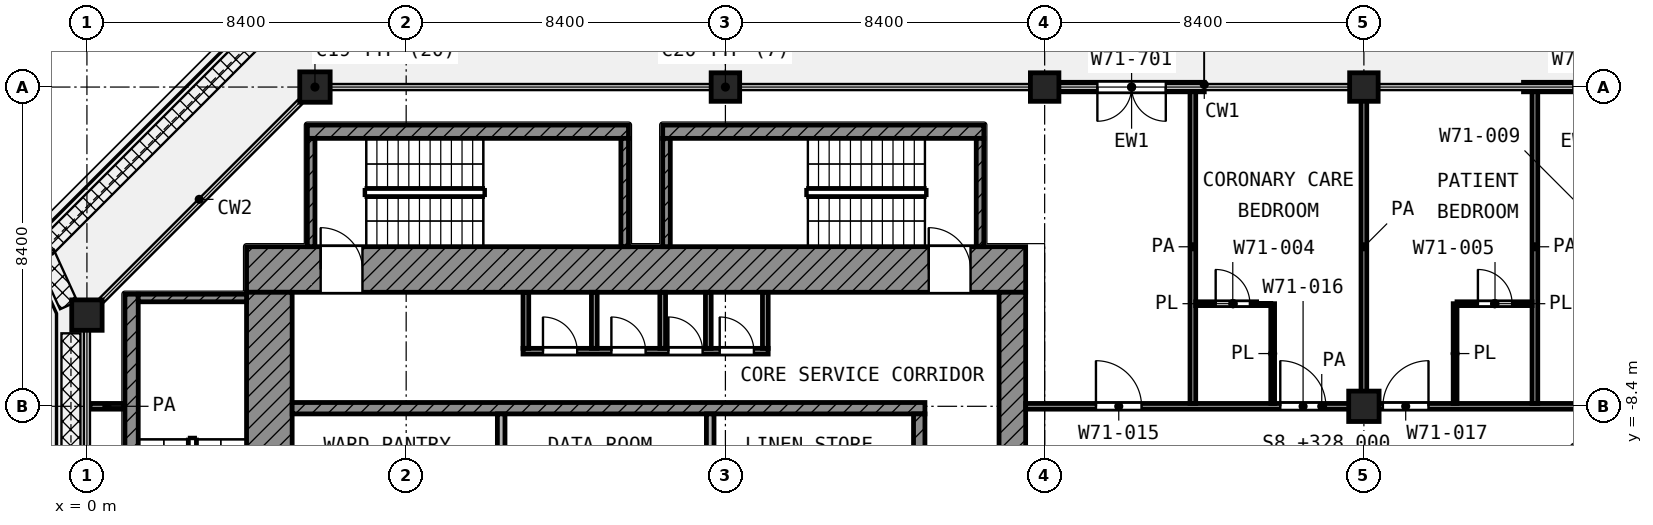
"""IFC4 building model, lengths in metres.
Left out: names, types, materials, properties, quantities, classifications, styles, units other than length and angle.
Written with IfcOpenShell. Run it as: python <this file> out.ifc"""

import sys

from ifc_helpers import new_model, si_unit, direction, frame, frame_2d, origin, origin_2d, place, context, subcontext, project, spatial, rectangle, extrude, element, fill, save


model = new_model("IFC4")
c1 = context("Model", 3, precision=1e-05, world=origin(), true_north=direction((0.0, 1.0)))
c2 = subcontext(c1, "Body", "Model", "MODEL_VIEW")
j1 = project(units=[si_unit("LENGTHUNIT", "METRE"), si_unit("PLANEANGLEUNIT", "RADIAN")], contexts=[c1])
p1 = place(None, origin())
s1 = spatial("IfcSite", under=j1, at=p1, CompositionType="ELEMENT")
p2 = place(p1, origin())
s2 = spatial("IfcBuilding", under=s1, at=p2, CompositionType="ELEMENT")
p3 = place(p2, frame((0.0, 0.0, 328.0)))
s3 = spatial("IfcBuildingStorey", under=s2, at=p3, CompositionType="ELEMENT", Elevation=328.0)
p4 = place(p3, frame((6.0, 0.0, 0.0), z_axis=(0.0, 0.0, 1.0), x_axis=(1.0, 0.0, 0.0)))
e1 = element("IfcColumn", 1, at=p4, inside=s3, PredefinedType="COLUMN", context=c2, shape_type="SweptSolid", body=[
    extrude(rectangle(XDim=0.8, YDim=0.8, at=origin_2d()), origin(), (0.0, 0.0, 1.0), 4.2),
])
for number, where, z_axis, x_axis in (
    (2, (16.8, 0.0, 0.0), (0.0, 0.0, 1.0), (1.0, 0.0, 0.0)),
    (3, (25.2, 0.0, 0.0), (0.0, 0.0, 1.0), (1.0, 0.0, 0.0)),
    (4, (33.6, 0.0, 0.0), (0.0, 0.0, 1.0), (1.0, 0.0, 0.0)),
):
    element("IfcColumn", number, at=place(p3, frame(where, z_axis=z_axis, x_axis=x_axis)), inside=s3, PredefinedType="COLUMN", context=c2, shape_type="SweptSolid", body=[
        extrude(rectangle(XDim=0.75, YDim=0.75, at=origin_2d()), origin(), (0.0, 0.0, 1.0), 4.2),
    ])
for number, where, z_axis, x_axis in (
    (5, (0.0, -6.0, 0.0), (0.0, 0.0, 1.0), (1.0, 0.0, 0.0)),
    (6, (33.6, -8.4, 0.0), (0.0, 0.0, 1.0), (1.0, 0.0, 0.0)),
):
    element("IfcColumn", number, at=place(p3, frame(where, z_axis=z_axis, x_axis=x_axis)), inside=s3, PredefinedType="COLUMN", context=c2, shape_type="SweptSolid", body=[
        extrude(rectangle(XDim=0.8, YDim=0.8, at=origin_2d()), origin(), (0.0, 0.0, 1.0), 4.2),
    ])
p5 = place(p3, frame((41.625, 0.0, 0.0), z_axis=(0.0, 0.0, 1.0), x_axis=(-1.0, 0.0, 0.0)))
e7 = element("IfcWall", 7, at=p5, inside=s3, PredefinedType="SOLIDWALL", context=c2, shape_type="SweptSolid", body=[
    extrude(rectangle(XDim=3.825, YDim=0.25, at=frame_2d((1.913, 0.0))), origin(), (0.0, 0.0, 1.0), 3.66),
])
p6 = place(p5, frame((1.512, 0.0, 0.0)))
e8 = element("IfcOpeningElement", 8, at=p6, cuts=e7, PredefinedType="OPENING", context=c2, shape_type="SweptSolid", body=[
    extrude(rectangle(XDim=1.0, YDim=2.1, at=frame_2d((0.5, 1.05))), frame((0.0, 0.135, 0.0), z_axis=(0.0, -1.0, 0.0), x_axis=(1.0, 0.0, 0.0)), (0.0, 0.0, 1.0), 0.27),
])
p7 = place(p3, frame((29.4, 0.0, 0.0), z_axis=(0.0, 0.0, 1.0), x_axis=(-1.0, 0.0, 0.0)))
e9 = element("IfcWall", 9, at=p7, inside=s3, PredefinedType="SOLIDWALL", context=c2, shape_type="SweptSolid", body=[
    extrude(rectangle(XDim=3.825, YDim=0.25, at=frame_2d((1.913, 0.0))), origin(), (0.0, 0.0, 1.0), 3.66),
])
p8 = place(p7, frame((1.012, 0.0, 0.0)))
e10 = element("IfcOpeningElement", 10, at=p8, cuts=e9, PredefinedType="OPENING", context=c2, shape_type="SweptSolid", body=[
    extrude(rectangle(XDim=1.8, YDim=2.1, at=frame_2d((0.9, 1.05))), frame((0.0, 0.135, 0.0), z_axis=(0.0, -1.0, 0.0), x_axis=(1.0, 0.0, 0.0)), (0.0, 0.0, 1.0), 0.27),
])
p9 = place(p3, frame((4.2, -4.8, 0.0), z_axis=(0.0, 0.0, 1.0), x_axis=(1.0, 0.0, 0.0)))
e11 = element("IfcWall", 11, at=p9, inside=s3, PredefinedType="SHEAR", context=c2, shape_type="SweptSolid", body=[
    extrude(rectangle(XDim=20.5, YDim=1.2, at=frame_2d((10.25, 0.0))), origin(), (0.0, 0.0, 1.0), 3.78),
])
p10 = place(p9, frame((1.95, 0.0, 0.0)))
e12 = element("IfcOpeningElement", 12, at=p10, cuts=e11, PredefinedType="OPENING", context=c2, shape_type="SweptSolid", body=[
    extrude(rectangle(XDim=1.1, YDim=2.1, at=frame_2d((0.55, 1.05))), frame((0.0, 0.61, 0.0), z_axis=(0.0, -1.0, 0.0), x_axis=(1.0, 0.0, 0.0)), (0.0, 0.0, 1.0), 1.22),
])
p11 = place(p9, frame((17.95, 0.0, 0.0)))
e13 = element("IfcOpeningElement", 13, at=p11, cuts=e11, PredefinedType="OPENING", context=c2, shape_type="SweptSolid", body=[
    extrude(rectangle(XDim=1.1, YDim=2.1, at=frame_2d((0.55, 1.05))), frame((0.0, 0.61, 0.0), z_axis=(0.0, -1.0, 0.0), x_axis=(1.0, 0.0, 0.0)), (0.0, 0.0, 1.0), 1.22),
])
p12 = place(p3, frame((4.8, -24.7, 0.0), z_axis=(0.0, 0.0, 1.0), x_axis=(0.0, 1.0, 0.0)))
e14 = element("IfcWall", 14, at=p12, inside=s3, PredefinedType="SHEAR", context=c2, shape_type="SweptSolid", body=[
    extrude(rectangle(XDim=19.3, YDim=1.2, at=frame_2d((9.65, 0.0))), origin(), (0.0, 0.0, 1.0), 3.78),
])
p13 = place(p12, frame((11.15, 0.0, 0.0)))
e15 = element("IfcOpeningElement", 15, at=p13, cuts=e14, PredefinedType="OPENING", context=c2, shape_type="SweptSolid", body=[
    extrude(rectangle(XDim=1.1, YDim=2.1, at=frame_2d((0.55, 1.05))), frame((0.0, 0.61, 0.0), z_axis=(0.0, -1.0, 0.0), x_axis=(1.0, 0.0, 0.0)), (0.0, 0.0, 1.0), 1.22),
])
p14 = place(p12, frame((1.85, 0.0, 0.0)))
e16 = element("IfcOpeningElement", 16, at=p14, cuts=e14, PredefinedType="OPENING", context=c2, shape_type="SweptSolid", body=[
    extrude(rectangle(XDim=1.1, YDim=2.1, at=frame_2d((0.55, 1.05))), frame((0.0, 0.61, 0.0), z_axis=(0.0, -1.0, 0.0), x_axis=(1.0, 0.0, 0.0)), (0.0, 0.0, 1.0), 1.22),
])
p15 = place(p3, frame((24.35, -24.0, 0.0), z_axis=(0.0, 0.0, 1.0), x_axis=(0.0, 1.0, 0.0)))
e17 = element("IfcWall", 17, at=p15, inside=s3, PredefinedType="SHEAR", context=c2, shape_type="SweptSolid", body=[
    extrude(rectangle(XDim=18.6, YDim=0.7, at=frame_2d((9.3, 0.0))), origin(), (0.0, 0.0, 1.0), 3.78),
])
p16 = place(p15, frame((10.5, 0.0, 0.0)))
e18 = element("IfcOpeningElement", 18, at=p16, cuts=e17, PredefinedType="OPENING", context=c2, shape_type="SweptSolid", body=[
    extrude(rectangle(XDim=1.8, YDim=2.1, at=frame_2d((0.9, 1.05))), frame((0.0, 0.36, 0.0), z_axis=(0.0, -1.0, 0.0), x_axis=(1.0, 0.0, 0.0)), (0.0, 0.0, 1.0), 0.72),
])
p17 = place(p3, frame((5.4, -8.45, 0.0), z_axis=(0.0, 0.0, 1.0), x_axis=(1.0, 0.0, 0.0)))
e19 = element("IfcWall", 19, at=p17, inside=s3, PredefinedType="SHEAR", context=c2, shape_type="SweptSolid", body=[
    extrude(rectangle(XDim=16.65, YDim=0.3, at=frame_2d((8.325, 0.0))), origin(), (0.0, 0.0, 1.0), 3.78),
])
p18 = place(p3, frame((21.9, -10.95, 0.0), z_axis=(0.0, 0.0, 1.0), x_axis=(0.0, 1.0, 0.0)))
e20 = element("IfcWall", 20, at=p18, inside=s3, PredefinedType="SHEAR", context=c2, shape_type="SweptSolid", body=[
    extrude(rectangle(XDim=2.35, YDim=0.3, at=frame_2d((1.175, 0.0))), origin(), (0.0, 0.0, 1.0), 3.78),
])
for number, where, z_axis, x_axis in (
    (21, (10.9, -10.95, 0.0), (0.0, 0.0, 1.0), (0.0, 1.0, 0.0)),
    (22, (16.4, -10.95, 0.0), (0.0, 0.0, 1.0), (0.0, 1.0, 0.0)),
):
    element("IfcWall", number, at=place(p3, frame(where, z_axis=z_axis, x_axis=x_axis)), inside=s3, PredefinedType="PARTITIONING", context=c2, shape_type="SweptSolid", body=[
        extrude(rectangle(XDim=2.35, YDim=0.2, at=frame_2d((1.175, 0.0))), origin(), (0.0, 0.0, 1.0), 3.78),
    ])
p19 = place(p3, frame((11.475, -6.95, 0.0), z_axis=(0.0, 0.0, 1.0), x_axis=(1.0, 0.0, 0.0)))
e23 = element("IfcWall", 23, at=p19, inside=s3, PredefinedType="PARTITIONING", context=c2, shape_type="SweptSolid", body=[
    extrude(rectangle(XDim=6.45, YDim=0.15, at=frame_2d((3.225, 0.0))), origin(), (0.0, 0.0, 1.0), 3.78),
])
p20 = place(p19, frame((0.525, 0.0, 0.0)))
e24 = element("IfcOpeningElement", 24, at=p20, cuts=e23, PredefinedType="OPENING", context=c2, shape_type="SweptSolid", body=[
    extrude(rectangle(XDim=0.9, YDim=2.1, at=frame_2d((0.45, 1.05))), frame((0.0, 0.085, 0.0), z_axis=(0.0, -1.0, 0.0), x_axis=(1.0, 0.0, 0.0)), (0.0, 0.0, 1.0), 0.17),
])
p21 = place(p19, frame((2.325, 0.0, 0.0)))
e25 = element("IfcOpeningElement", 25, at=p21, cuts=e23, PredefinedType="OPENING", context=c2, shape_type="SweptSolid", body=[
    extrude(rectangle(XDim=0.9, YDim=2.1, at=frame_2d((0.45, 1.05))), frame((0.0, 0.085, 0.0), z_axis=(0.0, -1.0, 0.0), x_axis=(1.0, 0.0, 0.0)), (0.0, 0.0, 1.0), 0.17),
])
p22 = place(p19, frame((3.825, 0.0, 0.0)))
e26 = element("IfcOpeningElement", 26, at=p22, cuts=e23, PredefinedType="OPENING", context=c2, shape_type="SweptSolid", body=[
    extrude(rectangle(XDim=0.9, YDim=2.1, at=frame_2d((0.45, 1.05))), frame((0.0, 0.085, 0.0), z_axis=(0.0, -1.0, 0.0), x_axis=(1.0, 0.0, 0.0)), (0.0, 0.0, 1.0), 0.17),
])
p23 = place(p19, frame((5.175, 0.0, 0.0)))
e27 = element("IfcOpeningElement", 27, at=p23, cuts=e23, PredefinedType="OPENING", context=c2, shape_type="SweptSolid", body=[
    extrude(rectangle(XDim=0.9, YDim=2.1, at=frame_2d((0.45, 1.05))), frame((0.0, 0.085, 0.0), z_axis=(0.0, -1.0, 0.0), x_axis=(1.0, 0.0, 0.0)), (0.0, 0.0, 1.0), 0.17),
])
for number, where, z_axis, x_axis in (
    (28, (11.55, -6.875, 0.0), (0.0, 0.0, 1.0), (0.0, 1.0, 0.0)),
    (29, (13.35, -6.875, 0.0), (0.0, 0.0, 1.0), (0.0, 1.0, 0.0)),
    (30, (15.15, -6.875, 0.0), (0.0, 0.0, 1.0), (0.0, 1.0, 0.0)),
    (31, (16.35, -6.875, 0.0), (0.0, 0.0, 1.0), (0.0, 1.0, 0.0)),
    (32, (17.85, -6.875, 0.0), (0.0, 0.0, 1.0), (0.0, 1.0, 0.0)),
):
    element("IfcWall", number, at=place(p3, frame(where, z_axis=z_axis, x_axis=x_axis)), inside=s3, PredefinedType="PARTITIONING", context=c2, shape_type="SweptSolid", body=[
        extrude(rectangle(XDim=1.475, YDim=0.15, at=frame_2d((0.738, 0.0))), origin(), (0.0, 0.0, 1.0), 3.78),
    ])
p24 = place(p3, frame((1.175, -13.9, 0.0), z_axis=(0.0, 0.0, 1.0), x_axis=(0.0, 1.0, 0.0)))
e33 = element("IfcWall", 33, at=p24, inside=s3, PredefinedType="SHEAR", context=c2, shape_type="SweptSolid", body=[
    extrude(rectangle(XDim=8.45, YDim=0.35, at=frame_2d((4.225, 0.0))), origin(), (0.0, 0.0, 1.0), 3.78),
])
p25 = place(p3, frame((1.35, -5.55, 0.0), z_axis=(0.0, 0.0, 1.0), x_axis=(1.0, 0.0, 0.0)))
e34 = element("IfcWall", 34, at=p25, inside=s3, PredefinedType="SHEAR", context=c2, shape_type="SweptSolid", body=[
    extrude(rectangle(XDim=2.85, YDim=0.2, at=frame_2d((1.425, 0.0))), origin(), (0.0, 0.0, 1.0), 3.78),
])
p26 = place(p3, frame((5.8, -1.175, 0.0), z_axis=(0.0, 0.0, 1.0), x_axis=(1.0, 0.0, 0.0)))
e35 = element("IfcWall", 35, at=p26, inside=s3, PredefinedType="SHEAR", context=c2, shape_type="SweptSolid", body=[
    extrude(rectangle(XDim=8.45, YDim=0.35, at=frame_2d((4.225, 0.0))), origin(), (0.0, 0.0, 1.0), 3.78),
])
for number, where, z_axis, x_axis in (
    (36, (5.9, -4.2, 0.0), (0.0, 0.0, 1.0), (0.0, 1.0, 0.0)),
    (37, (14.15, -4.2, 0.0), (0.0, 0.0, 1.0), (0.0, 1.0, 0.0)),
):
    element("IfcWall", number, at=place(p3, frame(where, z_axis=z_axis, x_axis=x_axis)), inside=s3, PredefinedType="SHEAR", context=c2, shape_type="SweptSolid", body=[
        extrude(rectangle(XDim=2.85, YDim=0.2, at=frame_2d((1.425, 0.0))), origin(), (0.0, 0.0, 1.0), 3.78),
    ])
p27 = place(p3, frame((15.15, -1.175, 0.0), z_axis=(0.0, 0.0, 1.0), x_axis=(1.0, 0.0, 0.0)))
e38 = element("IfcWall", 38, at=p27, inside=s3, PredefinedType="SHEAR", context=c2, shape_type="SweptSolid", body=[
    extrude(rectangle(XDim=8.45, YDim=0.35, at=frame_2d((4.225, 0.0))), origin(), (0.0, 0.0, 1.0), 3.78),
])
for number, where, z_axis, x_axis in (
    (39, (15.25, -4.2, 0.0), (0.0, 0.0, 1.0), (0.0, 1.0, 0.0)),
    (40, (23.5, -4.2, 0.0), (0.0, 0.0, 1.0), (0.0, 1.0, 0.0)),
):
    element("IfcWall", number, at=place(p3, frame(where, z_axis=z_axis, x_axis=x_axis)), inside=s3, PredefinedType="SHEAR", context=c2, shape_type="SweptSolid", body=[
        extrude(rectangle(XDim=2.85, YDim=0.2, at=frame_2d((1.425, 0.0))), origin(), (0.0, 0.0, 1.0), 3.78),
    ])
p28 = place(p3, frame((29.175, -5.7, 0.0), z_axis=(0.0, 0.0, 1.0), x_axis=(1.0, 0.0, 0.0)))
e41 = element("IfcWall", 41, at=p28, inside=s3, PredefinedType="PARTITIONING", context=c2, shape_type="SweptSolid", body=[
    extrude(rectangle(XDim=1.975, YDim=0.1, at=frame_2d((0.987, 0.0))), origin(), (0.0, 0.0, 1.0), 3.78),
])
p29 = place(p28, frame((0.525, 0.0, 0.0)))
e42 = element("IfcOpeningElement", 42, at=p29, cuts=e41, PredefinedType="OPENING", context=c2, shape_type="SweptSolid", body=[
    extrude(rectangle(XDim=0.9, YDim=2.1, at=frame_2d((0.45, 1.05))), frame((0.0, 0.06, 0.0), z_axis=(0.0, -1.0, 0.0), x_axis=(1.0, 0.0, 0.0)), (0.0, 0.0, 1.0), 0.12),
])
p30 = place(p3, frame((36.05, -5.7, 0.0), z_axis=(0.0, 0.0, 1.0), x_axis=(1.0, 0.0, 0.0)))
e43 = element("IfcWall", 43, at=p30, inside=s3, PredefinedType="PARTITIONING", context=c2, shape_type="SweptSolid", body=[
    extrude(rectangle(XDim=1.975, YDim=0.1, at=frame_2d((0.987, 0.0))), origin(), (0.0, 0.0, 1.0), 3.78),
])
p31 = place(p30, frame((0.55, 0.0, 0.0)))
e44 = element("IfcOpeningElement", 44, at=p31, cuts=e43, PredefinedType="OPENING", context=c2, shape_type="SweptSolid", body=[
    extrude(rectangle(XDim=0.9, YDim=2.1, at=frame_2d((0.45, 1.05))), frame((0.0, 0.06, 0.0), z_axis=(0.0, -1.0, 0.0), x_axis=(1.0, 0.0, 0.0)), (0.0, 0.0, 1.0), 0.12),
])
for number, where, z_axis, x_axis in (
    (45, (31.2, -8.325, 0.0), (0.0, 0.0, 1.0), (0.0, 1.0, 0.0)),
    (46, (36.0, -8.325, 0.0), (0.0, 0.0, 1.0), (0.0, 1.0, 0.0)),
):
    element("IfcWall", number, at=place(p3, frame(where, z_axis=z_axis, x_axis=x_axis)), inside=s3, PredefinedType="PARTITIONING", context=c2, shape_type="SweptSolid", body=[
        extrude(rectangle(XDim=2.625, YDim=0.1, at=frame_2d((1.312, 0.0))), origin(), (0.0, 0.0, 1.0), 3.78),
    ])
p32 = place(p3, frame((0.08, -8.4, 0.0), z_axis=(0.0, 0.0, 1.0), x_axis=(1.0, 0.0, 0.0)))
e47 = element("IfcWall", 47, at=p32, inside=s3, PredefinedType="PARTITIONING", context=c2, shape_type="SweptSolid", body=[
    extrude(rectangle(XDim=0.89, YDim=0.15, at=frame_2d((0.445, 0.0))), origin(), (0.0, 0.0, 1.0), 3.78),
])
p33 = place(p3, frame((24.7, -8.4, 0.0), z_axis=(0.0, 0.0, 1.0), x_axis=(1.0, 0.0, 0.0)))
e48 = element("IfcWall", 48, at=p33, inside=s3, PredefinedType="PARTITIONING", context=c2, shape_type="SweptSolid", body=[
    extrude(rectangle(XDim=15.582, YDim=0.15, at=frame_2d((7.791, 0.0))), origin(), (0.0, 0.0, 1.0), 3.78),
])
p34 = place(p33, frame((1.85, 0.0, 0.0)))
e49 = element("IfcOpeningElement", 49, at=p34, cuts=e48, PredefinedType="OPENING", context=c2, shape_type="SweptSolid", body=[
    extrude(rectangle(XDim=1.2, YDim=2.1, at=frame_2d((0.6, 1.05))), frame((0.0, 0.085, 0.0), z_axis=(0.0, -1.0, 0.0), x_axis=(1.0, 0.0, 0.0)), (0.0, 0.0, 1.0), 0.17),
])
p35 = place(p33, frame((6.7, 0.0, 0.0)))
e50 = element("IfcOpeningElement", 50, at=p35, cuts=e48, PredefinedType="OPENING", context=c2, shape_type="SweptSolid", body=[
    extrude(rectangle(XDim=1.2, YDim=2.1, at=frame_2d((0.6, 1.05))), frame((0.0, 0.085, 0.0), z_axis=(0.0, -1.0, 0.0), x_axis=(1.0, 0.0, 0.0)), (0.0, 0.0, 1.0), 0.17),
])
p36 = place(p33, frame((9.4, 0.0, 0.0)))
e51 = element("IfcOpeningElement", 51, at=p36, cuts=e48, PredefinedType="OPENING", context=c2, shape_type="SweptSolid", body=[
    extrude(rectangle(XDim=1.2, YDim=2.1, at=frame_2d((0.6, 1.05))), frame((0.0, 0.085, 0.0), z_axis=(0.0, -1.0, 0.0), x_axis=(1.0, 0.0, 0.0)), (0.0, 0.0, 1.0), 0.17),
])
for number, where, z_axis, x_axis in (
    (52, (29.1, -8.325, 0.0), (0.0, 0.0, 1.0), (0.0, 1.0, 0.0)),
    (53, (33.6, -8.325, 0.0), (0.0, 0.0, 1.0), (0.0, 1.0, 0.0)),
    (54, (38.1, -8.325, 0.0), (0.0, 0.0, 1.0), (0.0, 1.0, 0.0)),
):
    element("IfcWall", number, at=place(p3, frame(where, z_axis=z_axis, x_axis=x_axis)), inside=s3, PredefinedType="PARTITIONING", context=c2, shape_type="SweptSolid", body=[
        extrude(rectangle(XDim=8.245, YDim=0.15, at=frame_2d((4.123, 0.0))), origin(), (0.0, 0.0, 1.0), 3.78),
    ])
p37 = place(p8, origin())
e55 = element("IfcDoor", 55, at=p37, inside=s3, OperationType="DOUBLE_DOOR_SINGLE_SWING", PredefinedType="DOOR", context=c2, shape_type="SweptSolid", body=[
    extrude(rectangle(XDim=1.8, YDim=2.1, at=frame_2d((0.9, 1.05))), frame((0.0, 0.025, 0.0), z_axis=(0.0, -1.0, 0.0), x_axis=(1.0, 0.0, 0.0)), (0.0, 0.0, 1.0), 0.05),
])
fill(e10, e55)
p38 = place(p10, origin())
e56 = element("IfcDoor", 56, at=p38, inside=s3, OperationType="SINGLE_SWING_LEFT", PredefinedType="DOOR", context=c2, shape_type="SweptSolid", body=[
    extrude(rectangle(XDim=1.1, YDim=2.1, at=frame_2d((0.55, 1.05))), frame((0.0, 0.025, 0.0), z_axis=(0.0, -1.0, 0.0), x_axis=(1.0, 0.0, 0.0)), (0.0, 0.0, 1.0), 0.05),
])
fill(e12, e56)
p39 = place(p11, origin())
e57 = element("IfcDoor", 57, at=p39, inside=s3, OperationType="SINGLE_SWING_LEFT", PredefinedType="DOOR", context=c2, shape_type="SweptSolid", body=[
    extrude(rectangle(XDim=1.1, YDim=2.1, at=frame_2d((0.55, 1.05))), frame((0.0, 0.025, 0.0), z_axis=(0.0, -1.0, 0.0), x_axis=(1.0, 0.0, 0.0)), (0.0, 0.0, 1.0), 0.05),
])
fill(e13, e57)
p40 = place(p20, origin())
e58 = element("IfcDoor", 58, at=p40, inside=s3, OperationType="SINGLE_SWING_LEFT", PredefinedType="DOOR", context=c2, shape_type="SweptSolid", body=[
    extrude(rectangle(XDim=0.9, YDim=2.1, at=frame_2d((0.45, 1.05))), frame((0.0, 0.025, 0.0), z_axis=(0.0, -1.0, 0.0), x_axis=(1.0, 0.0, 0.0)), (0.0, 0.0, 1.0), 0.05),
])
fill(e24, e58)
p41 = place(p21, origin())
e59 = element("IfcDoor", 59, at=p41, inside=s3, OperationType="SINGLE_SWING_LEFT", PredefinedType="DOOR", context=c2, shape_type="SweptSolid", body=[
    extrude(rectangle(XDim=0.9, YDim=2.1, at=frame_2d((0.45, 1.05))), frame((0.0, 0.025, 0.0), z_axis=(0.0, -1.0, 0.0), x_axis=(1.0, 0.0, 0.0)), (0.0, 0.0, 1.0), 0.05),
])
fill(e25, e59)
p42 = place(p22, origin())
e60 = element("IfcDoor", 60, at=p42, inside=s3, OperationType="SINGLE_SWING_LEFT", PredefinedType="DOOR", context=c2, shape_type="SweptSolid", body=[
    extrude(rectangle(XDim=0.9, YDim=2.1, at=frame_2d((0.45, 1.05))), frame((0.0, 0.025, 0.0), z_axis=(0.0, -1.0, 0.0), x_axis=(1.0, 0.0, 0.0)), (0.0, 0.0, 1.0), 0.05),
])
fill(e26, e60)
p43 = place(p23, origin())
e61 = element("IfcDoor", 61, at=p43, inside=s3, OperationType="SINGLE_SWING_LEFT", PredefinedType="DOOR", context=c2, shape_type="SweptSolid", body=[
    extrude(rectangle(XDim=0.9, YDim=2.1, at=frame_2d((0.45, 1.05))), frame((0.0, 0.025, 0.0), z_axis=(0.0, -1.0, 0.0), x_axis=(1.0, 0.0, 0.0)), (0.0, 0.0, 1.0), 0.05),
])
fill(e27, e61)
p44 = place(p34, origin())
e62 = element("IfcDoor", 62, at=p44, inside=s3, OperationType="SINGLE_SWING_LEFT", PredefinedType="DOOR", context=c2, shape_type="SweptSolid", body=[
    extrude(rectangle(XDim=1.2, YDim=2.1, at=frame_2d((0.6, 1.05))), frame((0.0, 0.025, 0.0), z_axis=(0.0, -1.0, 0.0), x_axis=(1.0, 0.0, 0.0)), (0.0, 0.0, 1.0), 0.05),
])
fill(e49, e62)
p45 = place(p35, origin())
e63 = element("IfcDoor", 63, at=p45, inside=s3, OperationType="SINGLE_SWING_LEFT", PredefinedType="DOOR", context=c2, shape_type="SweptSolid", body=[
    extrude(rectangle(XDim=1.2, YDim=2.1, at=frame_2d((0.6, 1.05))), frame((0.0, 0.025, 0.0), z_axis=(0.0, -1.0, 0.0), x_axis=(1.0, 0.0, 0.0)), (0.0, 0.0, 1.0), 0.05),
])
fill(e50, e63)
p46 = place(p29, origin())
e64 = element("IfcDoor", 64, at=p46, inside=s3, OperationType="SINGLE_SWING_LEFT", PredefinedType="DOOR", context=c2, shape_type="SweptSolid", body=[
    extrude(rectangle(XDim=0.9, YDim=2.1, at=frame_2d((0.45, 1.05))), frame((0.0, 0.025, 0.0), z_axis=(0.0, -1.0, 0.0), x_axis=(1.0, 0.0, 0.0)), (0.0, 0.0, 1.0), 0.05),
])
fill(e42, e64)
p47 = place(p36, origin())
e65 = element("IfcDoor", 65, at=p47, inside=s3, OperationType="SINGLE_SWING_RIGHT", PredefinedType="DOOR", context=c2, shape_type="SweptSolid", body=[
    extrude(rectangle(XDim=1.2, YDim=2.1, at=frame_2d((0.6, 1.05))), frame((0.0, 0.025, 0.0), z_axis=(0.0, -1.0, 0.0), x_axis=(1.0, 0.0, 0.0)), (0.0, 0.0, 1.0), 0.05),
])
fill(e51, e65)
p48 = place(p31, origin())
e66 = element("IfcDoor", 66, at=p48, inside=s3, OperationType="SINGLE_SWING_LEFT", PredefinedType="DOOR", context=c2, shape_type="SweptSolid", body=[
    extrude(rectangle(XDim=0.9, YDim=2.1, at=frame_2d((0.45, 1.05))), frame((0.0, 0.025, 0.0), z_axis=(0.0, -1.0, 0.0), x_axis=(1.0, 0.0, 0.0)), (0.0, 0.0, 1.0), 0.05),
])
fill(e44, e66)
save(model, sys.argv[1])
